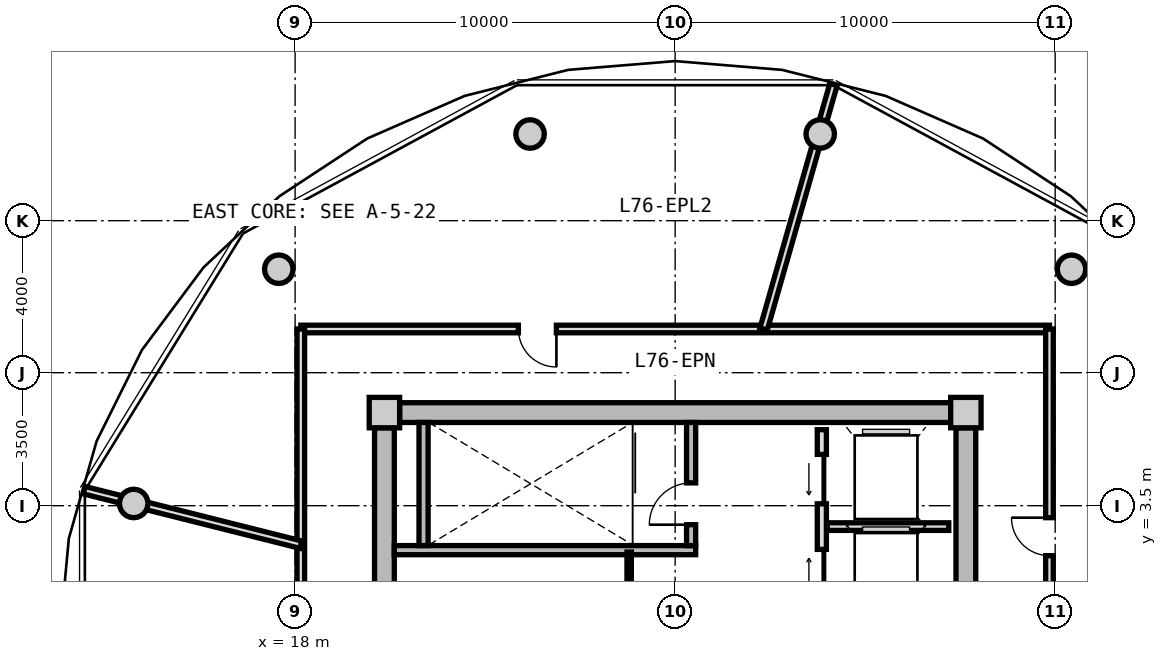
"""IFC4 building model, lengths in metres.
Left out: names, types, materials, properties, quantities, classifications, styles, units other than length and angle.
Written with IfcOpenShell. Run it as: python <this file> out.ifc"""

import sys

from ifc_helpers import new_model, si_unit, direction, frame, frame_2d, origin, origin_2d, place, context, subcontext, project, spatial, rectangle, circle, extrude, source, transform, mapped, element, fill, save


model = new_model("IFC4")
c1 = context("Model", 3, precision=1e-05, world=origin(), true_north=direction((0.0, 1.0)))
c2 = subcontext(c1, "Body", "Model", "MODEL_VIEW")
j1 = project(units=[si_unit("LENGTHUNIT", "METRE"), si_unit("PLANEANGLEUNIT", "RADIAN")], contexts=[c1])
p1 = place(None, origin())
s1 = spatial("IfcSite", under=j1, at=p1, CompositionType="ELEMENT")
p2 = place(p1, origin())
s2 = spatial("IfcBuilding", under=s1, at=p2, CompositionType="ELEMENT")
p3 = place(p2, frame((0.0, 0.0, 244.4)))
s3 = spatial("IfcBuildingStorey", under=s2, at=p3, CompositionType="ELEMENT", Elevation=244.4)
m1 = source(origin(), c2, "Body", "SweptSolid", [
    extrude(rectangle(XDim=0.8, YDim=0.8, at=origin_2d()), origin(), (0.0, 0.0, 1.0), 5.45),
])
for number, where, z_axis, x_axis in (
    (1, (35.65, 5.95, 0.0), (0.0, 0.0, 1.0), (1.0, 0.0, 0.0)),
    (2, (20.35, 5.95, 0.0), (0.0, 0.0, 1.0), (1.0, 0.0, 0.0)),
):
    element("IfcColumn", number, at=place(p3, frame(where, z_axis=z_axis, x_axis=x_axis)), inside=s3, PredefinedType="COLUMN", context=c2, shape_type="MappedRepresentation", body=[
        mapped(m1, transform((0.0, 0.0, 0.0), x_axis=(1.0, 0.0, 0.0), y_axis=(0.0, 1.0, 0.0), z_axis=(0.0, 0.0, 1.0), scale=1.0)),
    ])
m2 = source(origin(), c2, "Body", "SweptSolid", [
    extrude(rectangle(XDim=14.5, YDim=0.52, at=frame_2d((7.25, 0.0))), origin(), (0.0, 0.0, 1.0), 5.175),
])
p4 = place(p3, frame((20.75, 5.95, 0.0), z_axis=(0.0, 0.0, 1.0), x_axis=(1.0, 0.0, 0.0)))
e3 = element("IfcWall", 3, at=p4, inside=s3, PredefinedType="SHEAR", context=c2, shape_type="MappedRepresentation", body=[
    mapped(m2, transform((0.0, 0.0, 0.0), x_axis=(1.0, 0.0, 0.0), y_axis=(0.0, 1.0, 0.0), z_axis=(0.0, 0.0, 1.0), scale=1.0)),
])
m3 = source(origin(), c2, "Body", "SweptSolid", [
    extrude(rectangle(XDim=11.1, YDim=0.52, at=frame_2d((5.55, 0.0))), origin(), (0.0, 0.0, 1.0), 5.175),
])
p5 = place(p3, frame((20.35, -5.55, 0.0), z_axis=(0.0, 0.0, 1.0), x_axis=(0.0, 1.0, 0.0)))
e4 = element("IfcWall", 4, at=p5, inside=s3, PredefinedType="SHEAR", context=c2, shape_type="MappedRepresentation", body=[
    mapped(m3, transform((0.0, 0.0, 0.0), x_axis=(1.0, 0.0, 0.0), y_axis=(0.0, 1.0, 0.0), z_axis=(0.0, 0.0, 1.0), scale=1.0)),
])
p6 = place(p5, frame((3.8, 0.0, 0.0)))
e5 = element("IfcOpeningElement", 5, at=p6, cuts=e4, PredefinedType="OPENING", context=c2, shape_type="SweptSolid", body=[
    extrude(rectangle(XDim=1.2, YDim=2.15, at=frame_2d((0.6, 1.075))), frame((0.0, 0.27, 0.0), z_axis=(0.0, -1.0, 0.0), x_axis=(1.0, 0.0, 0.0)), (0.0, 0.0, 1.0), 0.54),
])
p7 = place(p3, frame((35.65, 5.55, 0.0), z_axis=(0.0, 0.0, 1.0), x_axis=(0.0, -1.0, 0.0)))
e6 = element("IfcWall", 6, at=p7, inside=s3, PredefinedType="SHEAR", context=c2, shape_type="MappedRepresentation", body=[
    mapped(m3, transform((0.0, 0.0, 0.0), x_axis=(1.0, 0.0, 0.0), y_axis=(0.0, 1.0, 0.0), z_axis=(0.0, 0.0, 1.0), scale=1.0)),
])
p8 = place(p7, frame((5.65, 0.0, 0.0)))
e7 = element("IfcOpeningElement", 7, at=p8, cuts=e6, PredefinedType="OPENING", context=c2, shape_type="SweptSolid", body=[
    extrude(rectangle(XDim=1.2, YDim=2.15, at=frame_2d((0.6, 1.075))), frame((0.0, 0.27, 0.0), z_axis=(0.0, -1.0, 0.0), x_axis=(1.0, 0.0, 0.0)), (0.0, 0.0, 1.0), 0.54),
])
p9 = place(p7, frame((9.3, 0.0, 0.0)))
e8 = element("IfcOpeningElement", 8, at=p9, cuts=e6, PredefinedType="OPENING", context=c2, shape_type="SweptSolid", body=[
    extrude(rectangle(XDim=1.0, YDim=2.1, at=frame_2d((0.5, 1.05))), frame((0.0, 0.27, 0.0), z_axis=(0.0, -1.0, 0.0), x_axis=(1.0, 0.0, 0.0)), (0.0, 0.0, 1.0), 0.54),
])
m4 = source(origin(), c2, "Body", "SweptSolid", [
    extrude(circle(Radius=0.375, at=origin_2d()), origin(), (0.0, 0.0, 1.0), 5.45),
])
for number, where, z_axis, x_axis in (
    (9, (38.43, 9.723, 0.0), (0.0, 0.0, 1.0), (1.0, 0.0, 0.0)),
    (10, (31.818, 13.281, 0.0), (0.0, 0.0, 1.0), (1.0, 0.0, 0.0)),
    (11, (24.182, 13.281, 0.0), (0.0, 0.0, 1.0), (1.0, 0.0, 0.0)),
    (12, (17.57, 9.723, 0.0), (0.0, 0.0, 1.0), (1.0, 0.0, 0.0)),
    (13, (13.753, 3.559, 0.0), (0.0, 0.0, 1.0), (1.0, 0.0, 0.0)),
):
    element("IfcColumn", number, at=place(p3, frame(where, z_axis=z_axis, x_axis=x_axis)), inside=s3, PredefinedType="COLUMN", context=c2, shape_type="MappedRepresentation", body=[
        mapped(m4, transform((0.0, 0.0, 0.0), x_axis=(1.0, 0.0, 0.0), y_axis=(0.0, 1.0, 0.0), z_axis=(0.0, 0.0, 1.0), scale=1.0)),
    ])
m5 = source(origin(), c2, "Body", "SweptSolid", [
    extrude(rectangle(XDim=7.93, YDim=0.24, at=frame_2d((3.965, 0.0))), origin(), (0.0, 0.0, 1.0), 5.175),
])
p10 = place(p3, frame((20.61, 2.33, 0.0), z_axis=(0.0, 0.0, 1.0), x_axis=(1.0, 0.0, 0.0)))
e14 = element("IfcWall", 14, at=p10, inside=s3, PredefinedType="PARTITIONING", context=c2, shape_type="MappedRepresentation", body=[
    mapped(m5, transform((0.0, 0.0, 0.0), x_axis=(1.0, 0.0, 0.0), y_axis=(0.0, 1.0, 0.0), z_axis=(0.0, 0.0, 1.0), scale=1.0)),
])
m6 = source(origin(), c2, "Body", "SweptSolid", [
    extrude(rectangle(XDim=3.24, YDim=0.24, at=frame_2d((1.62, 0.0))), origin(), (0.0, 0.0, 1.0), 5.175),
])
p11 = place(p3, frame((21.38, 2.45, 0.0), z_axis=(0.0, 0.0, 1.0), x_axis=(0.0, 1.0, 0.0)))
e15 = element("IfcWall", 15, at=p11, inside=s3, PredefinedType="PARTITIONING", context=c2, shape_type="MappedRepresentation", body=[
    mapped(m6, transform((0.0, 0.0, 0.0), x_axis=(1.0, 0.0, 0.0), y_axis=(0.0, 1.0, 0.0), z_axis=(0.0, 0.0, 1.0), scale=1.0)),
])
p12 = place(p3, frame((28.42, 2.45, 0.0), z_axis=(0.0, 0.0, 1.0), x_axis=(0.0, 1.0, 0.0)))
e16 = element("IfcWall", 16, at=p12, inside=s3, PredefinedType="PARTITIONING", context=c2, shape_type="MappedRepresentation", body=[
    mapped(m6, transform((0.0, 0.0, 0.0), x_axis=(1.0, 0.0, 0.0), y_axis=(0.0, 1.0, 0.0), z_axis=(0.0, 0.0, 1.0), scale=1.0)),
])
p13 = place(p12, frame((0.55, 0.0, 0.0)))
e17 = element("IfcOpeningElement", 17, at=p13, cuts=e16, PredefinedType="OPENING", context=c2, shape_type="SweptSolid", body=[
    extrude(rectangle(XDim=1.1, YDim=2.15, at=frame_2d((0.55, 1.075))), frame((0.0, 0.13, 0.0), z_axis=(0.0, -1.0, 0.0), x_axis=(1.0, 0.0, 0.0)), (0.0, 0.0, 1.0), 0.26),
])
m7 = source(origin(), c2, "Body", "SweptSolid", [
    extrude(rectangle(XDim=5.0, YDim=0.24, at=frame_2d((2.5, 0.0))), origin(), (0.0, 0.0, 1.0), 5.16),
])
p14 = place(p3, frame((31.86, 0.5, 0.0), z_axis=(0.0, 0.0, 1.0), x_axis=(0.0, 1.0, 0.0)))
e18 = element("IfcWall", 18, at=p14, inside=s3, PredefinedType="PARTITIONING", context=c2, shape_type="MappedRepresentation", body=[
    mapped(m7, transform((0.0, 0.0, 0.0), x_axis=(1.0, 0.0, 0.0), y_axis=(0.0, 1.0, 0.0), z_axis=(0.0, 0.0, 1.0), scale=1.0)),
])
p15 = place(p14, frame((3.05, 0.0, 0.0)))
e19 = element("IfcOpeningElement", 19, at=p15, cuts=e18, PredefinedType="OPENING", context=c2, shape_type="SweptSolid", body=[
    extrude(rectangle(XDim=1.3, YDim=2.2, at=frame_2d((0.65, 1.1))), frame((0.0, 0.13, 0.0), z_axis=(0.0, -1.0, 0.0), x_axis=(1.0, 0.0, 0.0)), (0.0, 0.0, 1.0), 0.26),
])
p16 = place(p14, frame((0.55, 0.0, 0.0)))
e20 = element("IfcOpeningElement", 20, at=p16, cuts=e18, PredefinedType="OPENING", context=c2, shape_type="SweptSolid", body=[
    extrude(rectangle(XDim=1.3, YDim=2.2, at=frame_2d((0.65, 1.1))), frame((0.0, 0.13, 0.0), z_axis=(0.0, -1.0, 0.0), x_axis=(1.0, 0.0, 0.0)), (0.0, 0.0, 1.0), 0.26),
])
m8 = source(origin(), c2, "Body", "SweptSolid", [
    extrude(rectangle(XDim=3.2, YDim=0.2, at=frame_2d((1.6, 0.0))), origin(), (0.0, 0.0, 1.0), 5.16),
])
p17 = place(p3, frame((32.0, 2.95, 0.0), z_axis=(0.0, 0.0, 1.0), x_axis=(1.0, 0.0, 0.0)))
e21 = element("IfcWall", 21, at=p17, inside=s3, PredefinedType="PARTITIONING", context=c2, shape_type="MappedRepresentation", body=[
    mapped(m8, transform((0.0, 0.0, 0.0), x_axis=(1.0, 0.0, 0.0), y_axis=(0.0, 1.0, 0.0), z_axis=(0.0, 0.0, 1.0), scale=1.0)),
])
m9 = source(origin(), c2, "Body", "SweptSolid", [
    extrude(rectangle(XDim=2.33, YDim=0.115, at=frame_2d((1.165, 0.0))), origin(), (0.0, 0.0, 1.0), 5.16),
])
p18 = place(p3, frame((26.79, -0.05, 0.0), z_axis=(0.0, 0.0, 1.0), x_axis=(0.0, 1.0, 0.0)))
e22 = element("IfcWall", 22, at=p18, inside=s3, PredefinedType="PARTITIONING", context=c2, shape_type="MappedRepresentation", body=[
    mapped(m9, transform((0.0, 0.0, 0.0), x_axis=(1.0, 0.0, 0.0), y_axis=(0.0, 1.0, 0.0), z_axis=(0.0, 0.0, 1.0), scale=1.0)),
])
m10 = source(origin(), c2, "Body", "SweptSolid", [
    extrude(rectangle(XDim=19.7, YDim=0.2, at=frame_2d((9.85, 0.0))), origin(), (0.0, 0.0, 1.0), 5.16),
])
p19 = place(p3, frame((18.15, 8.15, 0.0), z_axis=(0.0, 0.0, 1.0), x_axis=(1.0, 0.0, 0.0)))
e23 = element("IfcWall", 23, at=p19, inside=s3, PredefinedType="PARTITIONING", context=c2, shape_type="MappedRepresentation", body=[
    mapped(m10, transform((0.0, 0.0, 0.0), x_axis=(1.0, 0.0, 0.0), y_axis=(0.0, 1.0, 0.0), z_axis=(0.0, 0.0, 1.0), scale=1.0)),
])
p20 = place(p19, frame((5.725, 0.0, 0.0)))
e24 = element("IfcOpeningElement", 24, at=p20, cuts=e23, PredefinedType="OPENING", context=c2, shape_type="SweptSolid", body=[
    extrude(rectangle(XDim=1.0, YDim=2.1, at=frame_2d((0.5, 1.05))), frame((0.0, 0.11, 0.0), z_axis=(0.0, -1.0, 0.0), x_axis=(1.0, 0.0, 0.0)), (0.0, 0.0, 1.0), 0.22),
])
m11 = source(origin(), c2, "Body", "SweptSolid", [
    extrude(rectangle(XDim=16.3, YDim=0.2, at=frame_2d((8.15, 0.0))), origin(), (0.0, 0.0, 1.0), 5.16),
])
p21 = place(p3, frame((18.15, -8.15, 0.0), z_axis=(0.0, 0.0, 1.0), x_axis=(0.0, 1.0, 0.0)))
e25 = element("IfcWall", 25, at=p21, inside=s3, PredefinedType="PARTITIONING", context=c2, shape_type="MappedRepresentation", body=[
    mapped(m11, transform((0.0, 0.0, 0.0), x_axis=(1.0, 0.0, 0.0), y_axis=(0.0, 1.0, 0.0), z_axis=(0.0, 0.0, 1.0), scale=1.0)),
])
p22 = place(p21, frame((4.966, 0.0, 0.0)))
e26 = element("IfcOpeningElement", 26, at=p22, cuts=e25, PredefinedType="OPENING", context=c2, shape_type="SweptSolid", body=[
    extrude(rectangle(XDim=1.0, YDim=2.1, at=frame_2d((0.5, 1.05))), frame((0.0, 0.11, 0.0), z_axis=(0.0, -1.0, 0.0), x_axis=(1.0, 0.0, 0.0)), (0.0, 0.0, 1.0), 0.22),
])
p23 = place(p3, frame((37.85, 8.15, 0.0), z_axis=(0.0, 0.0, 1.0), x_axis=(0.0, -1.0, 0.0)))
e27 = element("IfcWall", 27, at=p23, inside=s3, PredefinedType="PARTITIONING", context=c2, shape_type="MappedRepresentation", body=[
    mapped(m11, transform((0.0, 0.0, 0.0), x_axis=(1.0, 0.0, 0.0), y_axis=(0.0, 1.0, 0.0), z_axis=(0.0, 0.0, 1.0), scale=1.0)),
])
p24 = place(p23, frame((4.966, 0.0, 0.0)))
e28 = element("IfcOpeningElement", 28, at=p24, cuts=e27, PredefinedType="OPENING", context=c2, shape_type="SweptSolid", body=[
    extrude(rectangle(XDim=1.0, YDim=2.1, at=frame_2d((0.5, 1.05))), frame((0.0, 0.11, 0.0), z_axis=(0.0, -1.0, 0.0), x_axis=(1.0, 0.0, 0.0)), (0.0, 0.0, 1.0), 0.22),
])
m12 = source(origin(), c2, "Body", "SweptSolid", [
    extrude(rectangle(XDim=6.693, YDim=0.2, at=frame_2d((3.347, 0.0))), origin(), (0.0, 0.0, 1.0), 4.76),
])
p25 = place(p3, frame((30.328, 8.15, 0.0), z_axis=(0.0, 0.0, 1.0), x_axis=(0.2747066748, 0.96152807698, 0.0)))
e29 = element("IfcWall", 29, at=p25, inside=s3, PredefinedType="PARTITIONING", context=c2, shape_type="MappedRepresentation", body=[
    mapped(m12, transform((0.0, 0.0, 0.0), x_axis=(1.0, 0.0, 0.0), y_axis=(0.0, 1.0, 0.0), z_axis=(0.0, 0.0, 1.0), scale=1.0)),
])
m13 = source(origin(), c2, "Body", "SweptSolid", [
    extrude(rectangle(XDim=5.879, YDim=0.2, at=frame_2d((2.939, 0.0))), origin(), (0.0, 0.0, 1.0), 4.76),
])
p26 = place(p3, frame((18.15, 2.475, 0.0), z_axis=(0.0, 0.0, 1.0), x_axis=(-0.96984127658, 0.24373735504, 0.0)))
e30 = element("IfcWall", 30, at=p26, inside=s3, PredefinedType="PARTITIONING", context=c2, shape_type="MappedRepresentation", body=[
    mapped(m13, transform((0.0, 0.0, 0.0), x_axis=(1.0, 0.0, 0.0), y_axis=(0.0, 1.0, 0.0), z_axis=(0.0, 0.0, 1.0), scale=1.0)),
])
m14 = source(origin(), c2, "Body", "SweptSolid", [
    extrude(rectangle(XDim=1.1, YDim=2.15, at=frame_2d((0.55, 1.075))), frame((0.0, 0.025, 0.0), z_axis=(0.0, -1.0, 0.0), x_axis=(1.0, 0.0, 0.0)), (0.0, 0.0, 1.0), 0.05),
])
p27 = place(p13, origin())
e31 = element("IfcDoor", 31, at=p27, inside=s3, OperationType="SINGLE_SWING_LEFT", PredefinedType="DOOR", context=c2, shape_type="MappedRepresentation", body=[
    mapped(m14, transform((0.0, 0.0, 0.0), x_axis=(1.0, 0.0, 0.0), y_axis=(0.0, 1.0, 0.0), z_axis=(0.0, 0.0, 1.0), scale=1.0)),
])
fill(e17, e31)
m15 = source(origin(), c2, "Body", "SweptSolid", [
    extrude(rectangle(XDim=1.3, YDim=2.2, at=frame_2d((0.65, 1.1))), frame((0.0, 0.025, 0.0), z_axis=(0.0, -1.0, 0.0), x_axis=(1.0, 0.0, 0.0)), (0.0, 0.0, 1.0), 0.05),
])
p28 = place(p15, origin())
e32 = element("IfcDoor", 32, at=p28, inside=s3, OperationType="SLIDING_TO_LEFT", PredefinedType="DOOR", context=c2, shape_type="MappedRepresentation", body=[
    mapped(m15, transform((0.0, 0.0, 0.0), x_axis=(1.0, 0.0, 0.0), y_axis=(0.0, 1.0, 0.0), z_axis=(0.0, 0.0, 1.0), scale=1.0)),
])
fill(e19, e32)
p29 = place(p16, origin())
e33 = element("IfcDoor", 33, at=p29, inside=s3, OperationType="SLIDING_TO_RIGHT", PredefinedType="DOOR", context=c2, shape_type="MappedRepresentation", body=[
    mapped(m15, transform((0.0, 0.0, 0.0), x_axis=(1.0, 0.0, 0.0), y_axis=(0.0, 1.0, 0.0), z_axis=(0.0, 0.0, 1.0), scale=1.0)),
])
fill(e20, e33)
m16 = source(origin(), c2, "Body", "SweptSolid", [
    extrude(rectangle(XDim=1.0, YDim=2.1, at=frame_2d((0.5, 1.05))), frame((0.0, 0.025, 0.0), z_axis=(0.0, -1.0, 0.0), x_axis=(1.0, 0.0, 0.0)), (0.0, 0.0, 1.0), 0.05),
])
p30 = place(p24, frame((1.0, 0.0, 0.0), z_axis=(0.0, 0.0, 1.0), x_axis=(-1.0, 0.0, 0.0)))
e34 = element("IfcDoor", 34, at=p30, inside=s3, OperationType="SINGLE_SWING_RIGHT", PredefinedType="DOOR", context=c2, shape_type="MappedRepresentation", body=[
    mapped(m16, transform((0.0, 0.0, 0.0), x_axis=(1.0, 0.0, 0.0), y_axis=(0.0, 1.0, 0.0), z_axis=(0.0, 0.0, 1.0), scale=1.0)),
])
fill(e28, e34)
p31 = place(p20, frame((1.0, 0.0, 0.0), z_axis=(0.0, 0.0, 1.0), x_axis=(-1.0, 0.0, 0.0)))
e35 = element("IfcDoor", 35, at=p31, inside=s3, OperationType="SINGLE_SWING_LEFT", PredefinedType="DOOR", context=c2, shape_type="MappedRepresentation", body=[
    mapped(m16, transform((0.0, 0.0, 0.0), x_axis=(1.0, 0.0, 0.0), y_axis=(0.0, 1.0, 0.0), z_axis=(0.0, 0.0, 1.0), scale=1.0)),
])
fill(e24, e35)
save(model, sys.argv[1])
